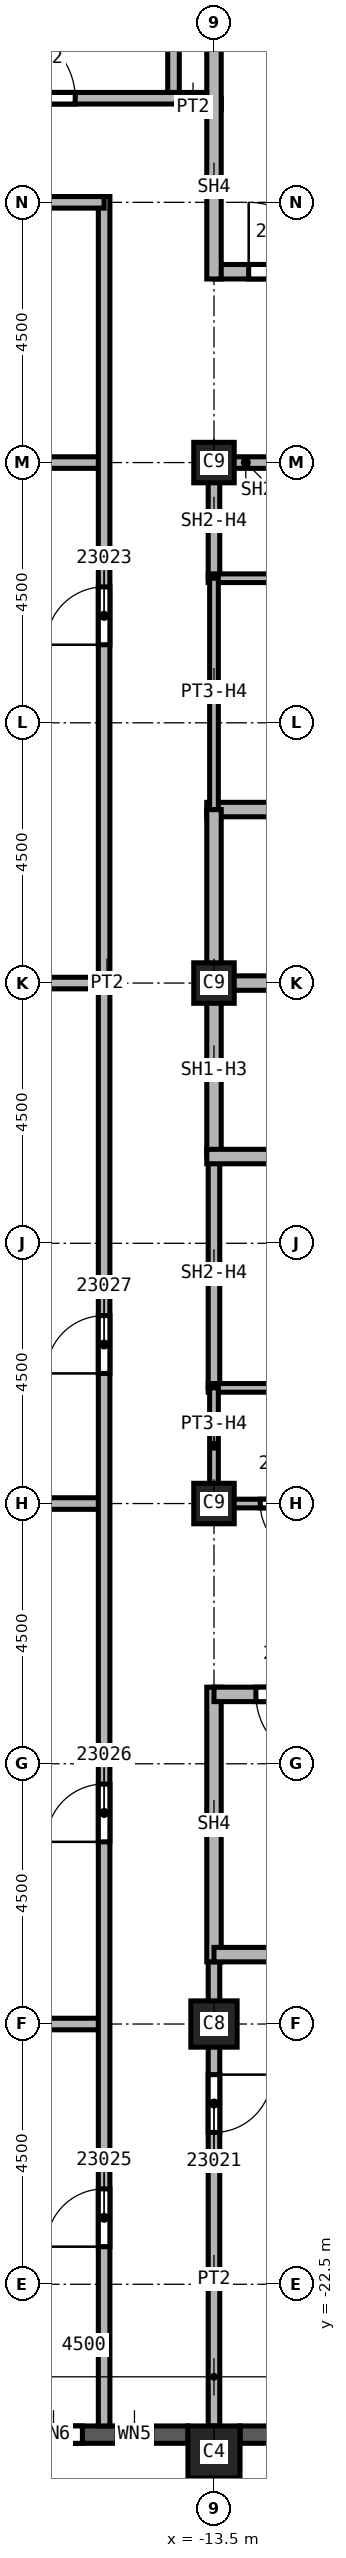
"""IFC4 building model, lengths in metres.
Left out: names, types, materials, properties, quantities, classifications, styles, units other than length and angle.
Written with IfcOpenShell. Run it as: python <this file> out.ifc"""

import sys

from ifc_helpers import new_model, si_unit, direction, frame, frame_2d, origin, origin_2d, place, context, subcontext, project, spatial, rectangle, extrude, element, fill, save


model = new_model("IFC4")
c1 = context("Model", 3, precision=1e-05, world=origin(), true_north=direction((0.0, 1.0)))
c2 = subcontext(c1, "Body", "Model", "MODEL_VIEW")
j1 = project(units=[si_unit("LENGTHUNIT", "METRE"), si_unit("PLANEANGLEUNIT", "RADIAN")], contexts=[c1])
p1 = place(None, origin())
s1 = spatial("IfcSite", under=j1, at=p1, CompositionType="ELEMENT")
p2 = place(p1, origin())
s2 = spatial("IfcBuilding", under=s1, at=p2, CompositionType="ELEMENT")
p3 = place(p2, frame((0.0, 0.0, 330.0)))
s3 = spatial("IfcBuildingStorey", under=s2, at=p3, CompositionType="ELEMENT", Elevation=330.0)
p4 = place(p3, frame((-13.5, -18.0, 0.0), z_axis=(0.0, 0.0, 1.0), x_axis=(1.0, 0.0, 0.0)))
e1 = element("IfcColumn", 1, at=p4, inside=s3, PredefinedType="COLUMN", context=c2, shape_type="SweptSolid", body=[
    extrude(rectangle(XDim=0.8, YDim=0.8, at=origin_2d()), origin(), (0.0, 0.0, 1.0), 3.74),
])
for number, where, z_axis, x_axis in (
    (2, (-13.5, 0.0, 0.0), (0.0, 0.0, 1.0), (1.0, 0.0, 0.0)),
    (3, (-13.5, 9.0, 0.0), (0.0, 0.0, 1.0), (1.0, 0.0, 0.0)),
    (4, (-13.5, -9.0, 0.0), (0.0, 0.0, 1.0), (1.0, 0.0, 0.0)),
):
    element("IfcColumn", number, at=place(p3, frame(where, z_axis=z_axis, x_axis=x_axis)), inside=s3, PredefinedType="COLUMN", context=c2, shape_type="SweptSolid", body=[
        extrude(rectangle(XDim=0.7, YDim=0.7, at=origin_2d()), origin(), (0.0, 0.0, 1.0), 3.74),
    ])
p5 = place(p3, frame((-13.5, -25.4, 0.0), z_axis=(0.0, 0.0, 1.0), x_axis=(1.0, 0.0, 0.0)))
e5 = element("IfcColumn", 5, at=p5, inside=s3, PredefinedType="COLUMN", context=c2, shape_type="SweptSolid", body=[
    extrude(rectangle(XDim=0.9, YDim=0.9, at=origin_2d()), origin(), (0.0, 0.0, 1.0), 3.74),
])
p6 = place(p3, frame((-17.55, -25.1, 0.0), z_axis=(0.0, 0.0, 1.0), x_axis=(1.0, 0.0, 0.0)))
e6 = element("IfcWall", 6, at=p6, inside=s3, PredefinedType="SOLIDWALL", context=c2, shape_type="SweptSolid", body=[
    extrude(rectangle(XDim=3.6, YDim=0.3, at=frame_2d((1.8, 0.0))), origin(), (0.0, 0.0, 1.0), 3.14),
])
p7 = place(p6, frame((0.775, 0.0, 0.8)))
e7 = element("IfcOpeningElement", 7, at=p7, cuts=e6, PredefinedType="OPENING", context=c2, shape_type="SweptSolid", body=[
    extrude(rectangle(XDim=1.0, YDim=1.95, at=frame_2d((0.5, 0.975))), frame((0.0, 0.15, 0.0), z_axis=(0.0, -1.0, 0.0), x_axis=(1.0, 0.0, 0.0)), (0.0, 0.0, 1.0), 0.3),
])
p8 = place(p6, frame((2.375, 0.0, 0.8)))
e8 = element("IfcOpeningElement", 8, at=p8, cuts=e6, PredefinedType="OPENING", context=c2, shape_type="SweptSolid", body=[
    extrude(rectangle(XDim=0.6, YDim=1.95, at=frame_2d((0.3, 0.975))), frame((0.0, 0.15, 0.0), z_axis=(0.0, -1.0, 0.0), x_axis=(1.0, 0.0, 0.0)), (0.0, 0.0, 1.0), 0.3),
])
p9 = place(p3, frame((-13.05, -25.1, 0.0), z_axis=(0.0, 0.0, 1.0), x_axis=(1.0, 0.0, 0.0)))
e9 = element("IfcWall", 9, at=p9, inside=s3, PredefinedType="SOLIDWALL", context=c2, shape_type="SweptSolid", body=[
    extrude(rectangle(XDim=3.6, YDim=0.3, at=frame_2d((1.8, 0.0))), origin(), (0.0, 0.0, 1.0), 3.14),
])
p10 = place(p9, frame((0.6, 0.0, 0.8)))
e10 = element("IfcOpeningElement", 10, at=p10, cuts=e9, PredefinedType="OPENING", context=c2, shape_type="SweptSolid", body=[
    extrude(rectangle(XDim=2.4, YDim=1.95, at=frame_2d((1.2, 0.975))), frame((0.0, 0.15, 0.0), z_axis=(0.0, -1.0, 0.0), x_axis=(1.0, 0.0, 0.0)), (0.0, 0.0, 1.0), 0.3),
])
for number, where, z_axis, x_axis in (
    (11, (-26.55, -9.0, 0.0), (0.0, 0.0, 1.0), (1.0, 0.0, 0.0)),
    (12, (-26.55, 9.0, 0.0), (0.0, 0.0, 1.0), (1.0, 0.0, 0.0)),
):
    element("IfcWall", number, at=place(p3, frame(where, z_axis=z_axis, x_axis=x_axis)), inside=s3, PredefinedType="PARTITIONING", context=c2, shape_type="SweptSolid", body=[
        extrude(rectangle(XDim=11.15, YDim=0.2, at=frame_2d((5.575, 0.0))), origin(), (0.0, 0.0, 1.0), 3.74),
    ])
p11 = place(p3, frame((-24.3, -18.0, 0.0), z_axis=(0.0, 0.0, 1.0), x_axis=(1.0, 0.0, 0.0)))
e13 = element("IfcWall", 13, at=p11, inside=s3, PredefinedType="PARTITIONING", context=c2, shape_type="SweptSolid", body=[
    extrude(rectangle(XDim=8.9, YDim=0.2, at=frame_2d((4.45, 0.0))), origin(), (0.0, 0.0, 1.0), 3.74),
])
p12 = place(p3, frame((-15.4, 0.0, 0.0), z_axis=(0.0, 0.0, 1.0), x_axis=(-1.0, 0.0, 0.0)))
e14 = element("IfcWall", 14, at=p12, inside=s3, PredefinedType="PARTITIONING", context=c2, shape_type="SweptSolid", body=[
    extrude(rectangle(XDim=11.15, YDim=0.2, at=frame_2d((5.575, 0.0))), origin(), (0.0, 0.0, 1.0), 3.74),
])
p13 = place(p3, frame((-15.4, -24.95, 0.0), z_axis=(0.0, 0.0, 1.0), x_axis=(0.0, 1.0, 0.0)))
e15 = element("IfcWall", 15, at=p13, inside=s3, PredefinedType="PARTITIONING", context=c2, shape_type="SweptSolid", body=[
    extrude(rectangle(XDim=38.55, YDim=0.2, at=frame_2d((19.275, 0.0))), origin(), (0.0, 0.0, 1.0), 3.74),
])
p14 = place(p13, frame((30.8, 0.0, 0.0)))
e16 = element("IfcOpeningElement", 16, at=p14, cuts=e15, PredefinedType="OPENING", context=c2, shape_type="SweptSolid", body=[
    extrude(rectangle(XDim=1.0, YDim=2.1, at=frame_2d((0.5, 1.05))), frame((0.0, 0.1, 0.0), z_axis=(0.0, -1.0, 0.0), x_axis=(1.0, 0.0, 0.0)), (0.0, 0.0, 1.0), 0.2),
])
p15 = place(p13, frame((3.1, 0.0, 0.0)))
e17 = element("IfcOpeningElement", 17, at=p15, cuts=e15, PredefinedType="OPENING", context=c2, shape_type="SweptSolid", body=[
    extrude(rectangle(XDim=1.0, YDim=2.1, at=frame_2d((0.5, 1.05))), frame((0.0, 0.1, 0.0), z_axis=(0.0, -1.0, 0.0), x_axis=(1.0, 0.0, 0.0)), (0.0, 0.0, 1.0), 0.2),
])
p16 = place(p13, frame((10.1, 0.0, 0.0)))
e18 = element("IfcOpeningElement", 18, at=p16, cuts=e15, PredefinedType="OPENING", context=c2, shape_type="SweptSolid", body=[
    extrude(rectangle(XDim=1.0, YDim=2.1, at=frame_2d((0.5, 1.05))), frame((0.0, 0.1, 0.0), z_axis=(0.0, -1.0, 0.0), x_axis=(1.0, 0.0, 0.0)), (0.0, 0.0, 1.0), 0.2),
])
p17 = place(p13, frame((18.2, 0.0, 0.0)))
e19 = element("IfcOpeningElement", 19, at=p17, cuts=e15, PredefinedType="OPENING", context=c2, shape_type="SweptSolid", body=[
    extrude(rectangle(XDim=1.0, YDim=2.1, at=frame_2d((0.5, 1.05))), frame((0.0, 0.1, 0.0), z_axis=(0.0, -1.0, 0.0), x_axis=(1.0, 0.0, 0.0)), (0.0, 0.0, 1.0), 0.2),
])
p18 = place(p3, frame((-15.4, 13.5, 0.0), z_axis=(0.0, 0.0, 1.0), x_axis=(-1.0, 0.0, 0.0)))
e20 = element("IfcWall", 20, at=p18, inside=s3, PredefinedType="PARTITIONING", context=c2, shape_type="SweptSolid", body=[
    extrude(rectangle(XDim=6.6, YDim=0.2, at=frame_2d((3.3, 0.0))), origin(), (0.0, 0.0, 1.0), 3.74),
])
p19 = place(p18, frame((3.7, 0.0, 0.0)))
e21 = element("IfcOpeningElement", 21, at=p19, cuts=e20, PredefinedType="OPENING", context=c2, shape_type="SweptSolid", body=[
    extrude(rectangle(XDim=1.0, YDim=2.1, at=frame_2d((0.5, 1.05))), frame((0.0, 0.1, 0.0), z_axis=(0.0, -1.0, 0.0), x_axis=(1.0, 0.0, 0.0)), (0.0, 0.0, 1.0), 0.2),
])
p20 = place(p3, frame((-14.1, 15.2, 0.0), z_axis=(0.0, 0.0, 1.0), x_axis=(1.0, 0.0, 0.0)))
e22 = element("IfcWall", 22, at=p20, inside=s3, PredefinedType="PARTITIONING", context=c2, shape_type="SweptSolid", body=[
    extrude(rectangle(XDim=0.725, YDim=0.2, at=frame_2d((0.363, 0.0))), origin(), (0.0, 0.0, 1.0), 3.74),
])
p21 = place(p3, frame((-13.5, -16.675, 0.0), z_axis=(0.0, 0.0, 1.0), x_axis=(0.0, -1.0, 0.0)))
e23 = element("IfcWall", 23, at=p21, inside=s3, PredefinedType="PARTITIONING", context=c2, shape_type="SweptSolid", body=[
    extrude(rectangle(XDim=8.275, YDim=0.2, at=frame_2d((4.137, 0.0))), origin(), (0.0, 0.0, 1.0), 3.74),
])
p22 = place(p21, frame((2.2, 0.0, 0.0)))
e24 = element("IfcOpeningElement", 24, at=p22, cuts=e23, PredefinedType="OPENING", context=c2, shape_type="SweptSolid", body=[
    extrude(rectangle(XDim=1.0, YDim=2.1, at=frame_2d((0.5, 1.05))), frame((0.0, 0.1, 0.0), z_axis=(0.0, -1.0, 0.0), x_axis=(1.0, 0.0, 0.0)), (0.0, 0.0, 1.0), 0.2),
])
p23 = place(p3, frame((-13.5, -7.0, 0.0), z_axis=(0.0, 0.0, 1.0), x_axis=(0.0, 1.0, 0.0)))
e25 = element("IfcWall", 25, at=p23, inside=s3, PredefinedType="SOLIDWALL", context=c2, shape_type="SweptSolid", body=[
    extrude(rectangle(XDim=4.0, YDim=0.2, at=frame_2d((2.0, 0.0))), origin(), (0.0, 0.0, 1.0), 3.062),
])
p24 = place(p3, frame((-13.5, 7.0, 0.0), z_axis=(0.0, 0.0, 1.0), x_axis=(0.0, 1.0, 0.0)))
e26 = element("IfcWall", 26, at=p24, inside=s3, PredefinedType="SOLIDWALL", context=c2, shape_type="SweptSolid", body=[
    extrude(rectangle(XDim=2.1, YDim=0.2, at=frame_2d((1.05, 0.0))), origin(), (0.0, 0.0, 1.0), 3.062),
])
p25 = place(p3, frame((-13.5, 9.0, 0.0), z_axis=(0.0, 0.0, 1.0), x_axis=(1.0, 0.0, 0.0)))
e27 = element("IfcWall", 27, at=p25, inside=s3, PredefinedType="SOLIDWALL", context=c2, shape_type="SweptSolid", body=[
    extrude(rectangle(XDim=3.0, YDim=0.2, at=frame_2d((1.5, 0.0))), origin(), (0.0, 0.0, 1.0), 3.062),
])
p26 = place(p25, frame((1.0, 0.0, 0.0)))
e28 = element("IfcOpeningElement", 28, at=p26, cuts=e27, PredefinedType="OPENING", context=c2, shape_type="SweptSolid", body=[
    extrude(rectangle(XDim=1.1, YDim=2.1, at=frame_2d((0.55, 1.05))), frame((0.0, 0.1, 0.0), z_axis=(0.0, -1.0, 0.0), x_axis=(1.0, 0.0, 0.0)), (0.0, 0.0, 1.0), 0.2),
])
p27 = place(p3, frame((-13.625, 0.0, 0.0), z_axis=(0.0, 0.0, 1.0), x_axis=(1.0, 0.0, 0.0)))
e29 = element("IfcWall", 29, at=p27, inside=s3, PredefinedType="SOLIDWALL", context=c2, shape_type="SweptSolid", body=[
    extrude(rectangle(XDim=3.125, YDim=0.25, at=frame_2d((1.562, 0.0))), origin(), (0.0, 0.0, 1.0), 3.74),
])
p28 = place(p3, frame((-13.625, 3.0, 0.0), z_axis=(0.0, 0.0, 1.0), x_axis=(1.0, 0.0, 0.0)))
e30 = element("IfcWall", 30, at=p28, inside=s3, PredefinedType="SOLIDWALL", context=c2, shape_type="SweptSolid", body=[
    extrude(rectangle(XDim=6.125, YDim=0.25, at=frame_2d((3.062, 0.0))), origin(), (0.0, 0.0, 1.0), 3.74),
])
p29 = place(p28, frame((4.0, 0.0, 0.0)))
e31 = element("IfcOpeningElement", 31, at=p29, cuts=e30, PredefinedType="OPENING", context=c2, shape_type="SweptSolid", body=[
    extrude(rectangle(XDim=1.1, YDim=2.1, at=frame_2d((0.55, 1.05))), frame((0.0, 0.125, 0.0), z_axis=(0.0, -1.0, 0.0), x_axis=(1.0, 0.0, 0.0)), (0.0, 0.0, 1.0), 0.25),
])
p30 = place(p3, frame((-13.5, -3.0, 0.0), z_axis=(0.0, 0.0, 1.0), x_axis=(0.0, 1.0, 0.0)))
e32 = element("IfcWall", 32, at=p30, inside=s3, PredefinedType="SOLIDWALL", context=c2, shape_type="SweptSolid", body=[
    extrude(rectangle(XDim=6.0, YDim=0.25, at=frame_2d((3.0, 0.0))), origin(), (0.0, 0.0, 1.0), 3.062),
])
p31 = place(p3, frame((-13.625, -3.0, 0.0), z_axis=(0.0, 0.0, 1.0), x_axis=(1.0, 0.0, 0.0)))
e33 = element("IfcWall", 33, at=p31, inside=s3, PredefinedType="SOLIDWALL", context=c2, shape_type="SweptSolid", body=[
    extrude(rectangle(XDim=6.125, YDim=0.25, at=frame_2d((3.062, 0.0))), origin(), (0.0, 0.0, 1.0), 3.74),
])
p32 = place(p31, frame((4.0, 0.0, 0.0)))
e34 = element("IfcOpeningElement", 34, at=p32, cuts=e33, PredefinedType="OPENING", context=c2, shape_type="SweptSolid", body=[
    extrude(rectangle(XDim=1.1, YDim=2.1, at=frame_2d((0.55, 1.05))), frame((0.0, 0.125, 0.0), z_axis=(0.0, -1.0, 0.0), x_axis=(1.0, 0.0, 0.0)), (0.0, 0.0, 1.0), 0.25),
])
p33 = place(p3, frame((-13.5, -12.175, 0.0), z_axis=(0.0, 0.0, 1.0), x_axis=(0.0, -1.0, 0.0)))
e35 = element("IfcWall", 35, at=p33, inside=s3, PredefinedType="SOLIDWALL", context=c2, shape_type="SweptSolid", body=[
    extrude(rectangle(XDim=4.75, YDim=0.25, at=frame_2d((2.375, 0.0))), origin(), (0.0, 0.0, 1.0), 3.74),
])
p34 = place(p3, frame((-13.5, 12.3, 0.0), z_axis=(0.0, 0.0, 1.0), x_axis=(1.0, 0.0, 0.0)))
e36 = element("IfcWall", 36, at=p34, inside=s3, PredefinedType="SOLIDWALL", context=c2, shape_type="SweptSolid", body=[
    extrude(rectangle(XDim=9.125, YDim=0.25, at=frame_2d((4.562, 0.0))), origin(), (0.0, 0.0, 1.0), 3.74),
])
p35 = place(p34, frame((0.6, 0.0, 0.0)))
e37 = element("IfcOpeningElement", 37, at=p35, cuts=e36, PredefinedType="OPENING", context=c2, shape_type="SweptSolid", body=[
    extrude(rectangle(XDim=1.2, YDim=2.1, at=frame_2d((0.6, 1.05))), frame((0.0, 0.125, 0.0), z_axis=(0.0, -1.0, 0.0), x_axis=(1.0, 0.0, 0.0)), (0.0, 0.0, 1.0), 0.25),
])
p36 = place(p3, frame((-13.5, 12.175, 0.0), z_axis=(0.0, 0.0, 1.0), x_axis=(0.0, 1.0, 0.0)))
e38 = element("IfcWall", 38, at=p36, inside=s3, PredefinedType="SOLIDWALL", context=c2, shape_type="SweptSolid", body=[
    extrude(rectangle(XDim=4.75, YDim=0.25, at=frame_2d((2.375, 0.0))), origin(), (0.0, 0.0, 1.0), 3.74),
])
p37 = place(p3, frame((-4.5, -16.8, 0.0), z_axis=(0.0, 0.0, 1.0), x_axis=(-1.0, 0.0, 0.0)))
e39 = element("IfcWall", 39, at=p37, inside=s3, PredefinedType="SOLIDWALL", context=c2, shape_type="SweptSolid", body=[
    extrude(rectangle(XDim=9.0, YDim=0.25, at=frame_2d((4.5, 0.0))), origin(), (0.0, 0.0, 1.0), 3.74),
])
p38 = place(p3, frame((-4.375, -12.3, 0.0), z_axis=(0.0, 0.0, 1.0), x_axis=(-1.0, 0.0, 0.0)))
e40 = element("IfcWall", 40, at=p38, inside=s3, PredefinedType="SOLIDWALL", context=c2, shape_type="SweptSolid", body=[
    extrude(rectangle(XDim=9.125, YDim=0.25, at=frame_2d((4.562, 0.0))), origin(), (0.0, 0.0, 1.0), 3.74),
])
p39 = place(p38, frame((7.2, 0.0, 0.0)))
e41 = element("IfcOpeningElement", 41, at=p39, cuts=e40, PredefinedType="OPENING", context=c2, shape_type="SweptSolid", body=[
    extrude(rectangle(XDim=1.2, YDim=2.1, at=frame_2d((0.6, 1.05))), frame((0.0, 0.125, 0.0), z_axis=(0.0, -1.0, 0.0), x_axis=(1.0, 0.0, 0.0)), (0.0, 0.0, 1.0), 0.25),
])
for number, where, z_axis, x_axis in (
    (42, (-13.6, -7.0, 0.0), (0.0, 0.0, 1.0), (1.0, 0.0, 0.0)),
    (43, (-13.6, 7.0, 0.0), (0.0, 0.0, 1.0), (1.0, 0.0, 0.0)),
):
    element("IfcWall", number, at=place(p3, frame(where, z_axis=z_axis, x_axis=x_axis)), inside=s3, PredefinedType="PARTITIONING", context=c2, shape_type="SweptSolid", body=[
        extrude(rectangle(XDim=3.1, YDim=0.15, at=frame_2d((1.55, 0.0))), origin(), (0.0, 0.0, 1.0), 3.74),
    ])
p40 = place(p3, frame((-13.5, -9.075, 0.0), z_axis=(0.0, 0.0, 1.0), x_axis=(0.0, 1.0, 0.0)))
e44 = element("IfcWall", 44, at=p40, inside=s3, PredefinedType="PARTITIONING", context=c2, shape_type="SweptSolid", body=[
    extrude(rectangle(XDim=2.075, YDim=0.15, at=frame_2d((1.038, 0.0))), origin(), (0.0, 0.0, 1.0), 3.062),
])
p41 = place(p3, frame((-13.5, 3.0, 0.0), z_axis=(0.0, 0.0, 1.0), x_axis=(0.0, 1.0, 0.0)))
e45 = element("IfcWall", 45, at=p41, inside=s3, PredefinedType="PARTITIONING", context=c2, shape_type="SweptSolid", body=[
    extrude(rectangle(XDim=4.0, YDim=0.15, at=frame_2d((2.0, 0.0))), origin(), (0.0, 0.0, 1.0), 3.062),
])
p42 = place(p3, frame((-10.5, -9.0, 0.0), z_axis=(0.0, 0.0, 1.0), x_axis=(-1.0, 0.0, 0.0)))
e46 = element("IfcWall", 46, at=p42, inside=s3, PredefinedType="PARTITIONING", context=c2, shape_type="SweptSolid", body=[
    extrude(rectangle(XDim=3.0, YDim=0.15, at=frame_2d((1.5, 0.0))), origin(), (0.0, 0.0, 1.0), 3.062),
])
p43 = place(p42, frame((1.3, 0.0, 0.0)))
e47 = element("IfcOpeningElement", 47, at=p43, cuts=e46, PredefinedType="OPENING", context=c2, shape_type="SweptSolid", body=[
    extrude(rectangle(XDim=0.9, YDim=2.1, at=frame_2d((0.45, 1.05))), frame((0.0, 0.075, 0.0), z_axis=(0.0, -1.0, 0.0), x_axis=(1.0, 0.0, 0.0)), (0.0, 0.0, 1.0), 0.15),
])
p44 = place(p3, frame((-21.9, 15.3, 0.0), z_axis=(0.0, 0.0, 1.0), x_axis=(1.0, 0.0, 0.0)))
e48 = element("IfcWall", 48, at=p44, inside=s3, PredefinedType="SOLIDWALL", context=c2, shape_type="SweptSolid", body=[
    extrude(rectangle(XDim=8.275, YDim=0.2, at=frame_2d((4.137, 0.0))), origin(), (0.0, 0.0, 1.0), 3.74),
])
p45 = place(p44, frame((4.8, 0.0, 0.0)))
e49 = element("IfcOpeningElement", 49, at=p45, cuts=e48, PredefinedType="OPENING", context=c2, shape_type="SweptSolid", body=[
    extrude(rectangle(XDim=1.2, YDim=2.1, at=frame_2d((0.6, 1.05))), frame((0.0, 0.1, 0.0), z_axis=(0.0, -1.0, 0.0), x_axis=(1.0, 0.0, 0.0)), (0.0, 0.0, 1.0), 0.2),
])
p46 = place(p3, frame((-14.2, 15.4, 0.0), z_axis=(0.0, 0.0, 1.0), x_axis=(0.0, 1.0, 0.0)))
e50 = element("IfcWall", 50, at=p46, inside=s3, PredefinedType="SOLIDWALL", context=c2, shape_type="SweptSolid", body=[
    extrude(rectangle(XDim=5.9, YDim=0.2, at=frame_2d((2.95, 0.0))), origin(), (0.0, 0.0, 1.0), 3.74),
])
p47 = place(p43, origin())
e51 = element("IfcDoor", 51, at=p47, inside=s3, OperationType="SINGLE_SWING_RIGHT", PredefinedType="DOOR", context=c2, shape_type="SweptSolid", body=[
    extrude(rectangle(XDim=0.9, YDim=2.1, at=frame_2d((0.45, 1.05))), frame((0.0, 0.025, 0.0), z_axis=(0.0, -1.0, 0.0), x_axis=(1.0, 0.0, 0.0)), (0.0, 0.0, 1.0), 0.05),
])
fill(e47, e51)
p48 = place(p35, origin())
e52 = element("IfcDoor", 52, at=p48, inside=s3, OperationType="SINGLE_SWING_RIGHT", PredefinedType="DOOR", context=c2, shape_type="SweptSolid", body=[
    extrude(rectangle(XDim=1.2, YDim=2.1, at=frame_2d((0.6, 1.05))), frame((0.0, 0.025, 0.0), z_axis=(0.0, -1.0, 0.0), x_axis=(1.0, 0.0, 0.0)), (0.0, 0.0, 1.0), 0.05),
])
fill(e37, e52)
p49 = place(p39, origin())
e53 = element("IfcDoor", 53, at=p49, inside=s3, OperationType="SINGLE_SWING_LEFT", PredefinedType="DOOR", context=c2, shape_type="SweptSolid", body=[
    extrude(rectangle(XDim=1.2, YDim=2.1, at=frame_2d((0.6, 1.05))), frame((0.0, 0.025, 0.0), z_axis=(0.0, -1.0, 0.0), x_axis=(1.0, 0.0, 0.0)), (0.0, 0.0, 1.0), 0.05),
])
fill(e41, e53)
p50 = place(p22, origin())
e54 = element("IfcDoor", 54, at=p50, inside=s3, OperationType="SINGLE_SWING_RIGHT", PredefinedType="DOOR", context=c2, shape_type="SweptSolid", body=[
    extrude(rectangle(XDim=1.0, YDim=2.1, at=frame_2d((0.5, 1.05))), frame((0.0, 0.025, 0.0), z_axis=(0.0, -1.0, 0.0), x_axis=(1.0, 0.0, 0.0)), (0.0, 0.0, 1.0), 0.05),
])
fill(e24, e54)
p51 = place(p14, origin())
e55 = element("IfcDoor", 55, at=p51, inside=s3, OperationType="SINGLE_SWING_RIGHT", PredefinedType="DOOR", context=c2, shape_type="SweptSolid", body=[
    extrude(rectangle(XDim=1.0, YDim=2.1, at=frame_2d((0.5, 1.05))), frame((0.0, 0.025, 0.0), z_axis=(0.0, -1.0, 0.0), x_axis=(1.0, 0.0, 0.0)), (0.0, 0.0, 1.0), 0.05),
])
fill(e16, e55)
p52 = place(p15, origin())
e56 = element("IfcDoor", 56, at=p52, inside=s3, OperationType="SINGLE_SWING_RIGHT", PredefinedType="DOOR", context=c2, shape_type="SweptSolid", body=[
    extrude(rectangle(XDim=1.0, YDim=2.1, at=frame_2d((0.5, 1.05))), frame((0.0, 0.025, 0.0), z_axis=(0.0, -1.0, 0.0), x_axis=(1.0, 0.0, 0.0)), (0.0, 0.0, 1.0), 0.05),
])
fill(e17, e56)
p53 = place(p16, origin())
e57 = element("IfcDoor", 57, at=p53, inside=s3, OperationType="SINGLE_SWING_LEFT", PredefinedType="DOOR", context=c2, shape_type="SweptSolid", body=[
    extrude(rectangle(XDim=1.0, YDim=2.1, at=frame_2d((0.5, 1.05))), frame((0.0, 0.025, 0.0), z_axis=(0.0, -1.0, 0.0), x_axis=(1.0, 0.0, 0.0)), (0.0, 0.0, 1.0), 0.05),
])
fill(e18, e57)
p54 = place(p17, origin())
e58 = element("IfcDoor", 58, at=p54, inside=s3, OperationType="SINGLE_SWING_RIGHT", PredefinedType="DOOR", context=c2, shape_type="SweptSolid", body=[
    extrude(rectangle(XDim=1.0, YDim=2.1, at=frame_2d((0.5, 1.05))), frame((0.0, 0.025, 0.0), z_axis=(0.0, -1.0, 0.0), x_axis=(1.0, 0.0, 0.0)), (0.0, 0.0, 1.0), 0.05),
])
fill(e19, e58)
p55 = place(p45, origin())
e59 = element("IfcDoor", 59, at=p55, inside=s3, OperationType="SINGLE_SWING_RIGHT", PredefinedType="DOOR", context=c2, shape_type="SweptSolid", body=[
    extrude(rectangle(XDim=1.2, YDim=2.1, at=frame_2d((0.6, 1.05))), frame((0.0, 0.025, 0.0), z_axis=(0.0, -1.0, 0.0), x_axis=(1.0, 0.0, 0.0)), (0.0, 0.0, 1.0), 0.05),
])
fill(e49, e59)
p56 = place(p7, origin())
e60 = element("IfcWindow", 60, at=p56, inside=s3, PartitioningType="SINGLE_PANEL", PredefinedType="WINDOW", context=c2, shape_type="SweptSolid", body=[
    extrude(rectangle(XDim=1.0, YDim=1.95, at=frame_2d((0.5, 0.975))), frame((0.0, 0.03, 0.0), z_axis=(0.0, -1.0, 0.0), x_axis=(1.0, 0.0, 0.0)), (0.0, 0.0, 1.0), 0.06),
])
fill(e7, e60)
p57 = place(p8, origin())
e61 = element("IfcWindow", 61, at=p57, inside=s3, PartitioningType="SINGLE_PANEL", PredefinedType="WINDOW", context=c2, shape_type="SweptSolid", body=[
    extrude(rectangle(XDim=0.6, YDim=1.95, at=frame_2d((0.3, 0.975))), frame((0.0, 0.03, 0.0), z_axis=(0.0, -1.0, 0.0), x_axis=(1.0, 0.0, 0.0)), (0.0, 0.0, 1.0), 0.06),
])
fill(e8, e61)
save(model, sys.argv[1])
